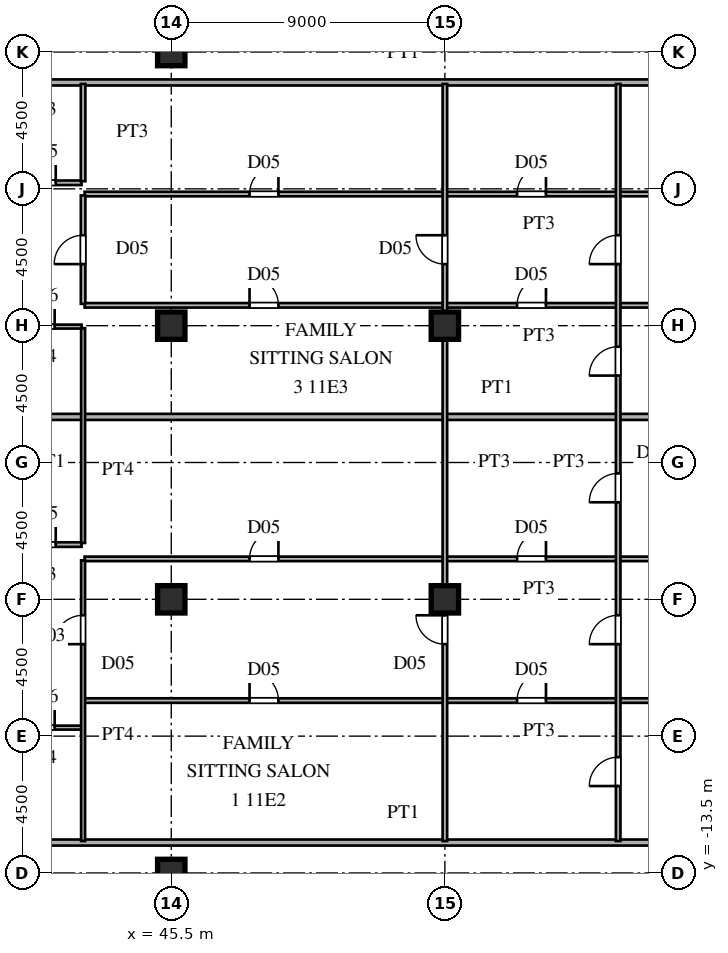
"""IFC4 building model, lengths in metres.
Left out: names, types, materials, properties, quantities, classifications, styles, units other than length and angle.
Written with IfcOpenShell. Run it as: python <this file> out.ifc"""

import sys

from ifc_helpers import new_model, si_unit, direction, frame, frame_2d, origin, origin_2d, place, context, subcontext, project, spatial, rectangle, i_section, extrude, source, transform, mapped, element, fill, save


model = new_model("IFC4")
c1 = context("Model", 3, precision=1e-05, world=origin(), true_north=direction((0.0, 1.0)))
c2 = subcontext(c1, "Body", "Model", "MODEL_VIEW")
j1 = project(units=[si_unit("LENGTHUNIT", "METRE"), si_unit("PLANEANGLEUNIT", "RADIAN")], contexts=[c1])
p1 = place(None, origin())
s1 = spatial("IfcSite", under=j1, at=p1, CompositionType="ELEMENT")
p2 = place(p1, origin())
s2 = spatial("IfcBuilding", under=s1, at=p2, CompositionType="ELEMENT")
p3 = place(p2, frame((0.0, 0.0, 44.1)))
s3 = spatial("IfcBuildingStorey", under=s2, at=p3, CompositionType="ELEMENT", Elevation=44.1)
m1 = source(origin(), c2, "Body", "SweptSolid", [
    extrude(i_section(OverallWidth=0.9, OverallDepth=0.9, WebThickness=0.036, FlangeThickness=0.055, at=origin_2d()), origin(), (0.0, 0.0, 1.0), 3.6),
])
for number, where, z_axis, x_axis in (
    (1, (45.5, -13.5, 0.0), (0.0, 0.0, 1.0), (1.0, 0.0, 0.0)),
    (2, (45.5, -4.5, 0.0), (0.0, 0.0, 1.0), (1.0, 0.0, 0.0)),
    (3, (45.5, 4.5, 0.0), (0.0, 0.0, 1.0), (1.0, 0.0, 0.0)),
    (4, (45.5, 13.5, 0.0), (0.0, 0.0, 1.0), (1.0, 0.0, 0.0)),
    (5, (54.5, -4.5, 0.0), (0.0, 0.0, 1.0), (1.0, 0.0, 0.0)),
    (6, (54.5, 4.5, 0.0), (0.0, 0.0, 1.0), (1.0, 0.0, 0.0)),
):
    element("IfcColumn", number, at=place(p3, frame(where, z_axis=z_axis, x_axis=x_axis)), inside=s3, PredefinedType="COLUMN", context=c2, shape_type="MappedRepresentation", body=[
        mapped(m1, transform((0.0, 0.0, 0.0), scale=1.0)),
    ])
p4 = place(p3, frame((39.93, -12.5, 0.0), z_axis=(0.0, 0.0, 1.0), x_axis=(1.0, 0.0, 0.0)))
e7 = element("IfcWall", 7, at=p4, inside=s3, PredefinedType="PARTITIONING", context=c2, shape_type="SweptSolid", body=[
    extrude(rectangle(XDim=26.407, YDim=0.2, at=frame_2d((13.204, 0.0))), origin(), (0.0, 0.0, 1.0), 3.38),
])
p5 = place(p3, frame((39.9, -8.72, 0.0), z_axis=(0.0, 0.0, 1.0), x_axis=(1.0, 0.0, 0.0)))
e8 = element("IfcWall", 8, at=p5, inside=s3, PredefinedType="PARTITIONING", context=c2, shape_type="SweptSolid", body=[
    extrude(rectangle(XDim=2.65, YDim=0.13, at=frame_2d((1.325, 0.0))), origin(), (0.0, 0.0, 1.0), 3.38),
])
p6 = place(p5, frame((0.885, 0.0, 0.0)))
e9 = element("IfcOpeningElement", 9, at=p6, cuts=e8, PredefinedType="OPENING", context=c2, shape_type="SweptSolid", body=[
    extrude(rectangle(XDim=0.88, YDim=2.1, at=frame_2d((0.44, 1.05))), frame((0.0, 0.075, 0.0), z_axis=(0.0, -1.0, 0.0), x_axis=(1.0, 0.0, 0.0)), (0.0, 0.0, 1.0), 0.15),
])
p7 = place(p3, frame((42.65, -7.83, 0.0), z_axis=(0.0, 0.0, 1.0), x_axis=(1.0, 0.0, 0.0)))
e10 = element("IfcWall", 10, at=p7, inside=s3, PredefinedType="PARTITIONING", context=c2, shape_type="SweptSolid", body=[
    extrude(rectangle(XDim=29.885, YDim=0.15, at=frame_2d((14.942, 0.0))), origin(), (0.0, 0.0, 1.0), 3.38),
])
p8 = place(p7, frame((5.425, 0.0, 0.0)))
e11 = element("IfcOpeningElement", 11, at=p8, cuts=e10, PredefinedType="OPENING", context=c2, shape_type="SweptSolid", body=[
    extrude(rectangle(XDim=0.95, YDim=2.15, at=frame_2d((0.475, 1.075))), frame((0.0, 0.085, 0.0), z_axis=(0.0, -1.0, 0.0), x_axis=(1.0, 0.0, 0.0)), (0.0, 0.0, 1.0), 0.17),
])
p9 = place(p7, frame((14.225, 0.0, 0.0)))
e12 = element("IfcOpeningElement", 12, at=p9, cuts=e10, PredefinedType="OPENING", context=c2, shape_type="SweptSolid", body=[
    extrude(rectangle(XDim=0.95, YDim=2.15, at=frame_2d((0.475, 1.075))), frame((0.0, 0.085, 0.0), z_axis=(0.0, -1.0, 0.0), x_axis=(1.0, 0.0, 0.0)), (0.0, 0.0, 1.0), 0.17),
])
p10 = place(p3, frame((42.65, -3.17, 0.0), z_axis=(0.0, 0.0, 1.0), x_axis=(1.0, 0.0, 0.0)))
e13 = element("IfcWall", 13, at=p10, inside=s3, PredefinedType="PARTITIONING", context=c2, shape_type="SweptSolid", body=[
    extrude(rectangle(XDim=29.885, YDim=0.15, at=frame_2d((14.942, 0.0))), origin(), (0.0, 0.0, 1.0), 3.38),
])
p11 = place(p10, frame((5.425, 0.0, 0.0)))
e14 = element("IfcOpeningElement", 14, at=p11, cuts=e13, PredefinedType="OPENING", context=c2, shape_type="SweptSolid", body=[
    extrude(rectangle(XDim=0.95, YDim=2.15, at=frame_2d((0.475, 1.075))), frame((0.0, 0.085, 0.0), z_axis=(0.0, -1.0, 0.0), x_axis=(1.0, 0.0, 0.0)), (0.0, 0.0, 1.0), 0.17),
])
p12 = place(p10, frame((14.225, 0.0, 0.0)))
e15 = element("IfcOpeningElement", 15, at=p12, cuts=e13, PredefinedType="OPENING", context=c2, shape_type="SweptSolid", body=[
    extrude(rectangle(XDim=0.95, YDim=2.15, at=frame_2d((0.475, 1.075))), frame((0.0, 0.085, 0.0), z_axis=(0.0, -1.0, 0.0), x_axis=(1.0, 0.0, 0.0)), (0.0, 0.0, 1.0), 0.17),
])
p13 = place(p3, frame((39.9, -2.7, 0.0), z_axis=(0.0, 0.0, 1.0), x_axis=(1.0, 0.0, 0.0)))
e16 = element("IfcWall", 16, at=p13, inside=s3, PredefinedType="PARTITIONING", context=c2, shape_type="SweptSolid", body=[
    extrude(rectangle(XDim=2.65, YDim=0.15, at=frame_2d((1.325, 0.0))), origin(), (0.0, 0.0, 1.0), 3.38),
])
p14 = place(p13, frame((0.85, 0.0, 0.0)))
e17 = element("IfcOpeningElement", 17, at=p14, cuts=e16, PredefinedType="OPENING", context=c2, shape_type="SweptSolid", body=[
    extrude(rectangle(XDim=0.95, YDim=2.15, at=frame_2d((0.475, 1.075))), frame((0.0, 0.085, 0.0), z_axis=(0.0, -1.0, 0.0), x_axis=(1.0, 0.0, 0.0)), (0.0, 0.0, 1.0), 0.17),
])
p15 = place(p3, frame((39.93, 1.5, 0.0), z_axis=(0.0, 0.0, 1.0), x_axis=(1.0, 0.0, 0.0)))
e18 = element("IfcWall", 18, at=p15, inside=s3, PredefinedType="PARTITIONING", context=c2, shape_type="SweptSolid", body=[
    extrude(rectangle(XDim=32.575, YDim=0.2, at=frame_2d((16.288, 0.0))), origin(), (0.0, 0.0, 1.0), 3.38),
])
p16 = place(p3, frame((39.9, 4.47, 0.0), z_axis=(0.0, 0.0, 1.0), x_axis=(1.0, 0.0, 0.0)))
e19 = element("IfcWall", 19, at=p16, inside=s3, PredefinedType="PARTITIONING", context=c2, shape_type="SweptSolid", body=[
    extrude(rectangle(XDim=2.65, YDim=0.13, at=frame_2d((1.325, 0.0))), origin(), (0.0, 0.0, 1.0), 2.68),
])
p17 = place(p16, frame((0.885, 0.0, 0.0)))
e20 = element("IfcOpeningElement", 20, at=p17, cuts=e19, PredefinedType="OPENING", context=c2, shape_type="SweptSolid", body=[
    extrude(rectangle(XDim=0.88, YDim=2.1, at=frame_2d((0.44, 1.05))), frame((0.0, 0.075, 0.0), z_axis=(0.0, -1.0, 0.0), x_axis=(1.0, 0.0, 0.0)), (0.0, 0.0, 1.0), 0.15),
])
p18 = place(p3, frame((42.65, 5.17, 0.0), z_axis=(0.0, 0.0, 1.0), x_axis=(1.0, 0.0, 0.0)))
e21 = element("IfcWall", 21, at=p18, inside=s3, PredefinedType="PARTITIONING", context=c2, shape_type="SweptSolid", body=[
    extrude(rectangle(XDim=29.885, YDim=0.15, at=frame_2d((14.942, 0.0))), origin(), (0.0, 0.0, 1.0), 3.38),
])
p19 = place(p18, frame((5.425, 0.0, 0.0)))
e22 = element("IfcOpeningElement", 22, at=p19, cuts=e21, PredefinedType="OPENING", context=c2, shape_type="SweptSolid", body=[
    extrude(rectangle(XDim=0.95, YDim=2.15, at=frame_2d((0.475, 1.075))), frame((0.0, 0.085, 0.0), z_axis=(0.0, -1.0, 0.0), x_axis=(1.0, 0.0, 0.0)), (0.0, 0.0, 1.0), 0.17),
])
p20 = place(p18, frame((14.225, 0.0, 0.0)))
e23 = element("IfcOpeningElement", 23, at=p20, cuts=e21, PredefinedType="OPENING", context=c2, shape_type="SweptSolid", body=[
    extrude(rectangle(XDim=0.95, YDim=2.15, at=frame_2d((0.475, 1.075))), frame((0.0, 0.085, 0.0), z_axis=(0.0, -1.0, 0.0), x_axis=(1.0, 0.0, 0.0)), (0.0, 0.0, 1.0), 0.17),
])
p21 = place(p3, frame((42.65, 8.83, 0.0), z_axis=(0.0, 0.0, 1.0), x_axis=(1.0, 0.0, 0.0)))
e24 = element("IfcWall", 24, at=p21, inside=s3, PredefinedType="PARTITIONING", context=c2, shape_type="SweptSolid", body=[
    extrude(rectangle(XDim=29.885, YDim=0.15, at=frame_2d((14.942, 0.0))), origin(), (0.0, 0.0, 1.0), 3.38),
])
p22 = place(p21, frame((5.425, 0.0, 0.0)))
e25 = element("IfcOpeningElement", 25, at=p22, cuts=e24, PredefinedType="OPENING", context=c2, shape_type="SweptSolid", body=[
    extrude(rectangle(XDim=0.95, YDim=2.15, at=frame_2d((0.475, 1.075))), frame((0.0, 0.085, 0.0), z_axis=(0.0, -1.0, 0.0), x_axis=(1.0, 0.0, 0.0)), (0.0, 0.0, 1.0), 0.17),
])
p23 = place(p21, frame((23.225, 0.0, 0.0)))
e26 = element("IfcOpeningElement", 26, at=p23, cuts=e24, PredefinedType="OPENING", context=c2, shape_type="SweptSolid", body=[
    extrude(rectangle(XDim=0.95, YDim=2.15, at=frame_2d((0.475, 1.075))), frame((0.0, 0.085, 0.0), z_axis=(0.0, -1.0, 0.0), x_axis=(1.0, 0.0, 0.0)), (0.0, 0.0, 1.0), 0.17),
])
p24 = place(p21, frame((14.225, 0.0, 0.0)))
e27 = element("IfcOpeningElement", 27, at=p24, cuts=e24, PredefinedType="OPENING", context=c2, shape_type="SweptSolid", body=[
    extrude(rectangle(XDim=0.95, YDim=2.15, at=frame_2d((0.475, 1.075))), frame((0.0, 0.085, 0.0), z_axis=(0.0, -1.0, 0.0), x_axis=(1.0, 0.0, 0.0)), (0.0, 0.0, 1.0), 0.17),
])
p25 = place(p3, frame((39.9, 9.2, 0.0), z_axis=(0.0, 0.0, 1.0), x_axis=(1.0, 0.0, 0.0)))
e28 = element("IfcWall", 28, at=p25, inside=s3, PredefinedType="PARTITIONING", context=c2, shape_type="SweptSolid", body=[
    extrude(rectangle(XDim=2.65, YDim=0.15, at=frame_2d((1.325, 0.0))), origin(), (0.0, 0.0, 1.0), 3.38),
])
p26 = place(p25, frame((0.85, 0.0, 0.0)))
e29 = element("IfcOpeningElement", 29, at=p26, cuts=e28, PredefinedType="OPENING", context=c2, shape_type="SweptSolid", body=[
    extrude(rectangle(XDim=0.95, YDim=2.15, at=frame_2d((0.475, 1.075))), frame((0.0, 0.085, 0.0), z_axis=(0.0, -1.0, 0.0), x_axis=(1.0, 0.0, 0.0)), (0.0, 0.0, 1.0), 0.17),
])
p27 = place(p3, frame((39.93, 12.5, 0.0), z_axis=(0.0, 0.0, 1.0), x_axis=(1.0, 0.0, 0.0)))
e30 = element("IfcWall", 30, at=p27, inside=s3, PredefinedType="PARTITIONING", context=c2, shape_type="SweptSolid", body=[
    extrude(rectangle(XDim=26.407, YDim=0.2, at=frame_2d((13.204, 0.0))), origin(), (0.0, 0.0, 1.0), 3.38),
])
p28 = place(p3, frame((42.6, -12.45, 0.0), z_axis=(0.0, 0.0, 1.0), x_axis=(0.0, 1.0, 0.0)))
e31 = element("IfcWall", 31, at=p28, inside=s3, PredefinedType="PARTITIONING", context=c2, shape_type="SweptSolid", body=[
    extrude(rectangle(XDim=9.233, YDim=0.13, at=frame_2d((4.616, 0.0))), origin(), (0.0, 0.0, 1.0), 3.38),
])
p29 = place(p28, frame((6.475, 0.0, 0.0)))
e32 = element("IfcOpeningElement", 32, at=p29, cuts=e31, PredefinedType="OPENING", context=c2, shape_type="SweptSolid", body=[
    extrude(rectangle(XDim=0.95, YDim=2.15, at=frame_2d((0.475, 1.075))), frame((0.0, 0.075, 0.0), z_axis=(0.0, -1.0, 0.0), x_axis=(1.0, 0.0, 0.0)), (0.0, 0.0, 1.0), 0.15),
])
p30 = place(p3, frame((42.6, -2.648, 0.0), z_axis=(0.0, 0.0, 1.0), x_axis=(0.0, 1.0, 0.0)))
e33 = element("IfcWall", 33, at=p30, inside=s3, PredefinedType="PARTITIONING", context=c2, shape_type="SweptSolid", body=[
    extrude(rectangle(XDim=7.066, YDim=0.13, at=frame_2d((3.533, 0.0))), origin(), (0.0, 0.0, 1.0), 3.38),
])
p31 = place(p3, frame((42.6, 5.217, 0.0), z_axis=(0.0, 0.0, 1.0), x_axis=(0.0, 1.0, 0.0)))
e34 = element("IfcWall", 34, at=p31, inside=s3, PredefinedType="PARTITIONING", context=c2, shape_type="SweptSolid", body=[
    extrude(rectangle(XDim=3.566, YDim=0.15, at=frame_2d((1.783, 0.0))), origin(), (0.0, 0.0, 1.0), 3.38),
])
p32 = place(p31, frame((1.308, 0.0, 0.0)))
e35 = element("IfcOpeningElement", 35, at=p32, cuts=e34, PredefinedType="OPENING", context=c2, shape_type="SweptSolid", body=[
    extrude(rectangle(XDim=0.95, YDim=2.15, at=frame_2d((0.475, 1.075))), frame((0.0, 0.085, 0.0), z_axis=(0.0, -1.0, 0.0), x_axis=(1.0, 0.0, 0.0)), (0.0, 0.0, 1.0), 0.17),
])
p33 = place(p3, frame((42.6, 9.252, 0.0), z_axis=(0.0, 0.0, 1.0), x_axis=(0.0, 1.0, 0.0)))
e36 = element("IfcWall", 36, at=p33, inside=s3, PredefinedType="PARTITIONING", context=c2, shape_type="SweptSolid", body=[
    extrude(rectangle(XDim=3.198, YDim=0.15, at=frame_2d((1.599, 0.0))), origin(), (0.0, 0.0, 1.0), 3.38),
])
p34 = place(p3, frame((54.5, -12.45, 0.0), z_axis=(0.0, 0.0, 1.0), x_axis=(0.0, 1.0, 0.0)))
e37 = element("IfcWall", 37, at=p34, inside=s3, PredefinedType="PARTITIONING", context=c2, shape_type="SweptSolid", body=[
    extrude(rectangle(XDim=24.9, YDim=0.15, at=frame_2d((12.45, 0.0))), origin(), (0.0, 0.0, 1.0), 2.68),
])
p35 = place(p34, frame((6.475, 0.0, 0.0)))
e38 = element("IfcOpeningElement", 38, at=p35, cuts=e37, PredefinedType="OPENING", context=c2, shape_type="SweptSolid", body=[
    extrude(rectangle(XDim=0.95, YDim=2.15, at=frame_2d((0.475, 1.075))), frame((0.0, 0.085, 0.0), z_axis=(0.0, -1.0, 0.0), x_axis=(1.0, 0.0, 0.0)), (0.0, 0.0, 1.0), 0.17),
])
p36 = place(p34, frame((18.975, 0.0, 0.0)))
e39 = element("IfcOpeningElement", 39, at=p36, cuts=e37, PredefinedType="OPENING", context=c2, shape_type="SweptSolid", body=[
    extrude(rectangle(XDim=0.95, YDim=2.15, at=frame_2d((0.475, 1.075))), frame((0.0, 0.085, 0.0), z_axis=(0.0, -1.0, 0.0), x_axis=(1.0, 0.0, 0.0)), (0.0, 0.0, 1.0), 0.17),
])
p37 = place(p3, frame((60.2, -12.45, 0.0), z_axis=(0.0, 0.0, 1.0), x_axis=(0.0, 1.0, 0.0)))
e40 = element("IfcWall", 40, at=p37, inside=s3, PredefinedType="PARTITIONING", context=c2, shape_type="SweptSolid", body=[
    extrude(rectangle(XDim=24.9, YDim=0.15, at=frame_2d((12.45, 0.0))), origin(), (0.0, 0.0, 1.0), 3.38),
])
p38 = place(p37, frame((1.808, 0.0, 0.0)))
e41 = element("IfcOpeningElement", 41, at=p38, cuts=e40, PredefinedType="OPENING", context=c2, shape_type="SweptSolid", body=[
    extrude(rectangle(XDim=0.95, YDim=2.15, at=frame_2d((0.475, 1.075))), frame((0.0, 0.085, 0.0), z_axis=(0.0, -1.0, 0.0), x_axis=(1.0, 0.0, 0.0)), (0.0, 0.0, 1.0), 0.17),
])
p39 = place(p37, frame((6.475, 0.0, 0.0)))
e42 = element("IfcOpeningElement", 42, at=p39, cuts=e40, PredefinedType="OPENING", context=c2, shape_type="SweptSolid", body=[
    extrude(rectangle(XDim=0.95, YDim=2.15, at=frame_2d((0.475, 1.075))), frame((0.0, 0.085, 0.0), z_axis=(0.0, -1.0, 0.0), x_axis=(1.0, 0.0, 0.0)), (0.0, 0.0, 1.0), 0.17),
])
p40 = place(p37, frame((11.142, 0.0, 0.0)))
e43 = element("IfcOpeningElement", 43, at=p40, cuts=e40, PredefinedType="OPENING", context=c2, shape_type="SweptSolid", body=[
    extrude(rectangle(XDim=0.95, YDim=2.15, at=frame_2d((0.475, 1.075))), frame((0.0, 0.085, 0.0), z_axis=(0.0, -1.0, 0.0), x_axis=(1.0, 0.0, 0.0)), (0.0, 0.0, 1.0), 0.17),
])
p41 = place(p37, frame((15.308, 0.0, 0.0)))
e44 = element("IfcOpeningElement", 44, at=p41, cuts=e40, PredefinedType="OPENING", context=c2, shape_type="SweptSolid", body=[
    extrude(rectangle(XDim=0.95, YDim=2.15, at=frame_2d((0.475, 1.075))), frame((0.0, 0.085, 0.0), z_axis=(0.0, -1.0, 0.0), x_axis=(1.0, 0.0, 0.0)), (0.0, 0.0, 1.0), 0.17),
])
p42 = place(p37, frame((18.975, 0.0, 0.0)))
e45 = element("IfcOpeningElement", 45, at=p42, cuts=e40, PredefinedType="OPENING", context=c2, shape_type="SweptSolid", body=[
    extrude(rectangle(XDim=0.95, YDim=2.15, at=frame_2d((0.475, 1.075))), frame((0.0, 0.085, 0.0), z_axis=(0.0, -1.0, 0.0), x_axis=(1.0, 0.0, 0.0)), (0.0, 0.0, 1.0), 0.17),
])
m2 = source(origin(), c2, "Body", "SweptSolid", [
    extrude(rectangle(XDim=0.88, YDim=2.1, at=frame_2d((0.44, 1.05))), frame((0.0, 0.025, 0.0), z_axis=(0.0, -1.0, 0.0), x_axis=(1.0, 0.0, 0.0)), (0.0, 0.0, 1.0), 0.05),
])
p43 = place(p6, origin())
e46 = element("IfcDoor", 46, at=p43, inside=s3, OperationType="SINGLE_SWING_RIGHT", PredefinedType="DOOR", context=c2, shape_type="MappedRepresentation", body=[
    mapped(m2, transform((0.0, 0.0, 0.0), scale=1.0)),
])
fill(e9, e46)
m3 = source(origin(), c2, "Body", "SweptSolid", [
    extrude(rectangle(XDim=0.95, YDim=2.15, at=frame_2d((0.475, 1.075))), frame((0.0, 0.025, 0.0), z_axis=(0.0, -1.0, 0.0), x_axis=(1.0, 0.0, 0.0)), (0.0, 0.0, 1.0), 0.05),
])
p44 = place(p8, origin())
e47 = element("IfcDoor", 47, at=p44, inside=s3, OperationType="SINGLE_SWING_LEFT", PredefinedType="DOOR", context=c2, shape_type="MappedRepresentation", body=[
    mapped(m3, transform((0.0, 0.0, 0.0), scale=1.0)),
])
fill(e11, e47)
p45 = place(p9, origin())
e48 = element("IfcDoor", 48, at=p45, inside=s3, OperationType="SINGLE_SWING_RIGHT", PredefinedType="DOOR", context=c2, shape_type="MappedRepresentation", body=[
    mapped(m3, transform((0.0, 0.0, 0.0), scale=1.0)),
])
fill(e12, e48)
p46 = place(p11, origin())
e49 = element("IfcDoor", 49, at=p46, inside=s3, OperationType="SINGLE_SWING_RIGHT", PredefinedType="DOOR", context=c2, shape_type="MappedRepresentation", body=[
    mapped(m3, transform((0.0, 0.0, 0.0), scale=1.0)),
])
fill(e14, e49)
p47 = place(p12, origin())
e50 = element("IfcDoor", 50, at=p47, inside=s3, OperationType="SINGLE_SWING_RIGHT", PredefinedType="DOOR", context=c2, shape_type="MappedRepresentation", body=[
    mapped(m3, transform((0.0, 0.0, 0.0), scale=1.0)),
])
fill(e15, e50)
p48 = place(p14, origin())
e51 = element("IfcDoor", 51, at=p48, inside=s3, OperationType="SINGLE_SWING_RIGHT", PredefinedType="DOOR", context=c2, shape_type="MappedRepresentation", body=[
    mapped(m3, transform((0.0, 0.0, 0.0), scale=1.0)),
])
fill(e17, e51)
p49 = place(p17, origin())
e52 = element("IfcDoor", 52, at=p49, inside=s3, OperationType="SINGLE_SWING_RIGHT", PredefinedType="DOOR", context=c2, shape_type="MappedRepresentation", body=[
    mapped(m2, transform((0.0, 0.0, 0.0), scale=1.0)),
])
fill(e20, e52)
p50 = place(p19, origin())
e53 = element("IfcDoor", 53, at=p50, inside=s3, OperationType="SINGLE_SWING_LEFT", PredefinedType="DOOR", context=c2, shape_type="MappedRepresentation", body=[
    mapped(m3, transform((0.0, 0.0, 0.0), scale=1.0)),
])
fill(e22, e53)
p51 = place(p20, origin())
e54 = element("IfcDoor", 54, at=p51, inside=s3, OperationType="SINGLE_SWING_RIGHT", PredefinedType="DOOR", context=c2, shape_type="MappedRepresentation", body=[
    mapped(m3, transform((0.0, 0.0, 0.0), scale=1.0)),
])
fill(e23, e54)
p52 = place(p22, origin())
e55 = element("IfcDoor", 55, at=p52, inside=s3, OperationType="SINGLE_SWING_RIGHT", PredefinedType="DOOR", context=c2, shape_type="MappedRepresentation", body=[
    mapped(m3, transform((0.0, 0.0, 0.0), scale=1.0)),
])
fill(e25, e55)
p53 = place(p24, origin())
e56 = element("IfcDoor", 56, at=p53, inside=s3, OperationType="SINGLE_SWING_RIGHT", PredefinedType="DOOR", context=c2, shape_type="MappedRepresentation", body=[
    mapped(m3, transform((0.0, 0.0, 0.0), scale=1.0)),
])
fill(e27, e56)
p54 = place(p26, origin())
e57 = element("IfcDoor", 57, at=p54, inside=s3, OperationType="SINGLE_SWING_RIGHT", PredefinedType="DOOR", context=c2, shape_type="MappedRepresentation", body=[
    mapped(m3, transform((0.0, 0.0, 0.0), scale=1.0)),
])
fill(e29, e57)
p55 = place(p29, origin())
e58 = element("IfcDoor", 58, at=p55, inside=s3, OperationType="SINGLE_SWING_LEFT", PredefinedType="DOOR", context=c2, shape_type="MappedRepresentation", body=[
    mapped(m3, transform((0.0, 0.0, 0.0), scale=1.0)),
])
fill(e32, e58)
p56 = place(p32, origin())
e59 = element("IfcDoor", 59, at=p56, inside=s3, OperationType="SINGLE_SWING_LEFT", PredefinedType="DOOR", context=c2, shape_type="MappedRepresentation", body=[
    mapped(m3, transform((0.0, 0.0, 0.0), scale=1.0)),
])
fill(e35, e59)
p57 = place(p35, origin())
e60 = element("IfcDoor", 60, at=p57, inside=s3, OperationType="SINGLE_SWING_RIGHT", PredefinedType="DOOR", context=c2, shape_type="MappedRepresentation", body=[
    mapped(m3, transform((0.0, 0.0, 0.0), scale=1.0)),
])
fill(e38, e60)
p58 = place(p36, origin())
e61 = element("IfcDoor", 61, at=p58, inside=s3, OperationType="SINGLE_SWING_RIGHT", PredefinedType="DOOR", context=c2, shape_type="MappedRepresentation", body=[
    mapped(m3, transform((0.0, 0.0, 0.0), scale=1.0)),
])
fill(e39, e61)
p59 = place(p38, origin())
e62 = element("IfcDoor", 62, at=p59, inside=s3, OperationType="SINGLE_SWING_LEFT", PredefinedType="DOOR", context=c2, shape_type="MappedRepresentation", body=[
    mapped(m3, transform((0.0, 0.0, 0.0), scale=1.0)),
])
fill(e41, e62)
p60 = place(p39, origin())
e63 = element("IfcDoor", 63, at=p60, inside=s3, OperationType="SINGLE_SWING_LEFT", PredefinedType="DOOR", context=c2, shape_type="MappedRepresentation", body=[
    mapped(m3, transform((0.0, 0.0, 0.0), scale=1.0)),
])
fill(e42, e63)
p61 = place(p40, origin())
e64 = element("IfcDoor", 64, at=p61, inside=s3, OperationType="SINGLE_SWING_LEFT", PredefinedType="DOOR", context=c2, shape_type="MappedRepresentation", body=[
    mapped(m3, transform((0.0, 0.0, 0.0), scale=1.0)),
])
fill(e43, e64)
p62 = place(p41, origin())
e65 = element("IfcDoor", 65, at=p62, inside=s3, OperationType="SINGLE_SWING_LEFT", PredefinedType="DOOR", context=c2, shape_type="MappedRepresentation", body=[
    mapped(m3, transform((0.0, 0.0, 0.0), scale=1.0)),
])
fill(e44, e65)
p63 = place(p42, origin())
e66 = element("IfcDoor", 66, at=p63, inside=s3, OperationType="SINGLE_SWING_LEFT", PredefinedType="DOOR", context=c2, shape_type="MappedRepresentation", body=[
    mapped(m3, transform((0.0, 0.0, 0.0), scale=1.0)),
])
fill(e45, e66)
save(model, sys.argv[1])
